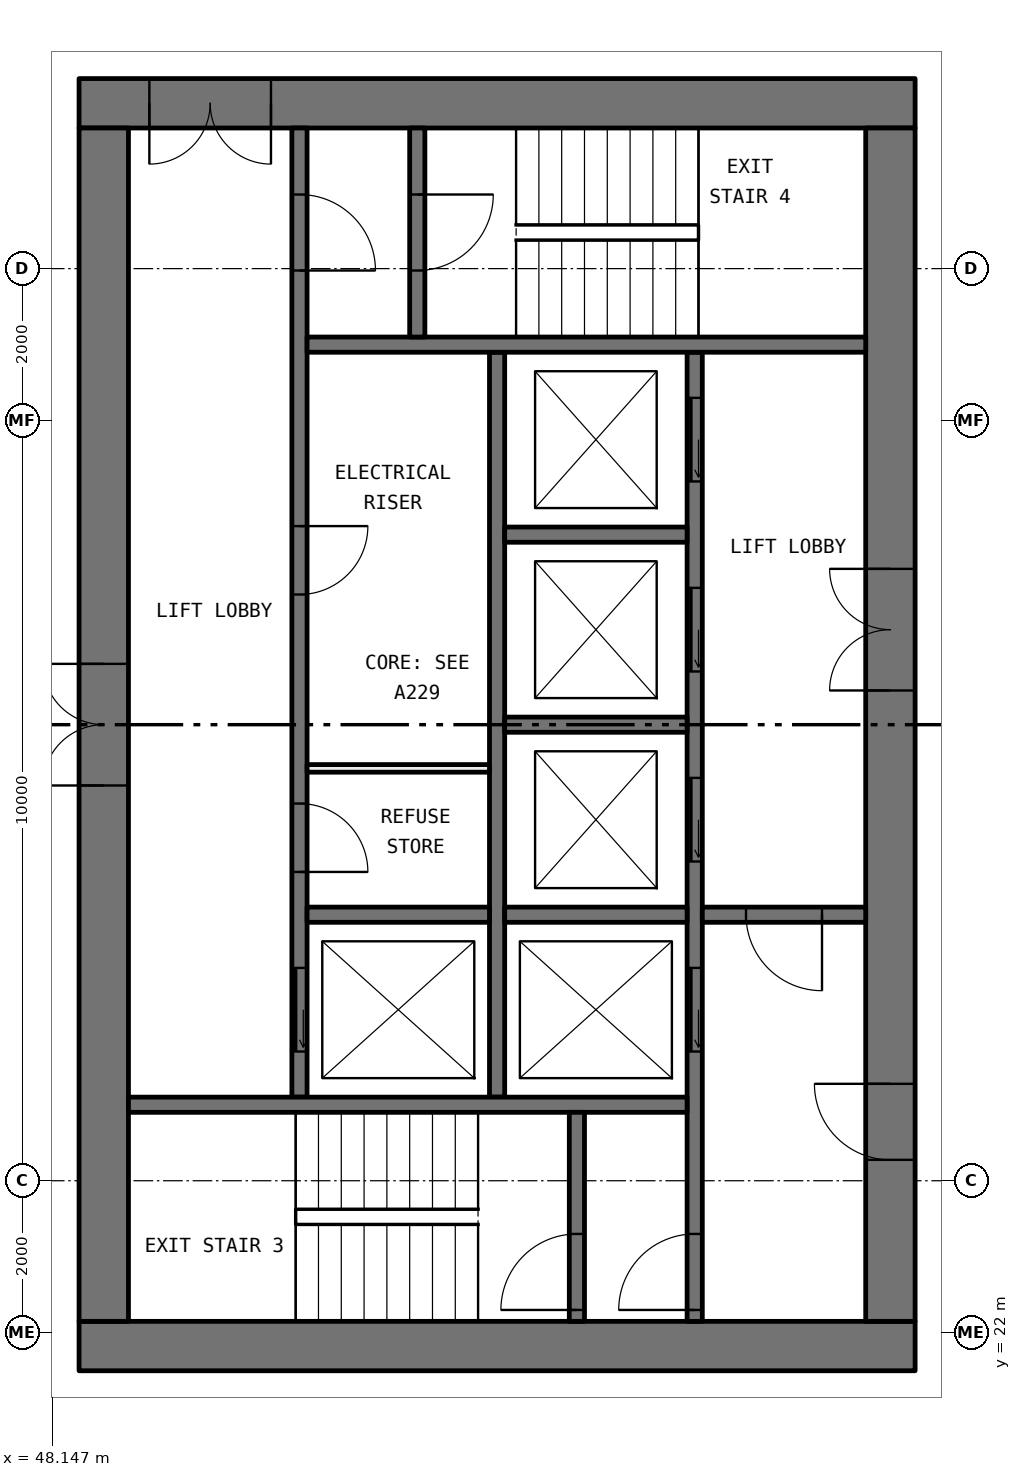
"""IFC4 building model, lengths in metres.
Left out: names, types, materials, properties, quantities, classifications, styles, units other than length and angle.
Written with IfcOpenShell. Run it as: python <this file> out.ifc"""

import sys

from ifc_helpers import new_model, si_unit, direction, frame, frame_2d, origin, place, context, subcontext, project, spatial, rectangle, extrude, element, fill, save


model = new_model("IFC4")
c1 = context("Model", 3, precision=1e-05, world=origin(), true_north=direction((0.0, 1.0)))
c2 = subcontext(c1, "Body", "Model", "MODEL_VIEW")
j1 = project(units=[si_unit("LENGTHUNIT", "METRE"), si_unit("PLANEANGLEUNIT", "RADIAN")], contexts=[c1])
p1 = place(None, origin())
s1 = spatial("IfcSite", under=j1, at=p1, CompositionType="ELEMENT")
p2 = place(p1, origin())
s2 = spatial("IfcBuilding", under=s1, at=p2, CompositionType="ELEMENT")
p3 = place(p2, frame((0.0, 0.0, 110.4)))
s3 = spatial("IfcBuildingStorey", under=s2, at=p3, CompositionType="ELEMENT", Elevation=110.4)
p4 = place(p3, frame((59.5, 21.825, 0.0), z_axis=(0.0, 0.0, 1.0), x_axis=(-1.0, 0.0, 0.0)))
e1 = element("IfcWall", 1, at=p4, inside=s3, PredefinedType="SHEAR", context=c2, shape_type="SweptSolid", body=[
    extrude(rectangle(XDim=11.0, YDim=0.65, at=frame_2d((5.5, 0.0))), origin(), (0.0, 0.0, 1.0), 3.05),
])
p5 = place(p3, frame((59.5, 38.175, 0.0), z_axis=(0.0, 0.0, 1.0), x_axis=(-1.0, 0.0, 0.0)))
e2 = element("IfcWall", 2, at=p5, inside=s3, PredefinedType="SHEAR", context=c2, shape_type="SweptSolid", body=[
    extrude(rectangle(XDim=11.0, YDim=0.65, at=frame_2d((5.5, 0.0))), origin(), (0.0, 0.0, 1.0), 3.05),
])
p6 = place(p5, frame((8.475, 0.0, 0.0)))
e3 = element("IfcOpeningElement", 3, at=p6, cuts=e2, PredefinedType="OPENING", context=c2, shape_type="SweptSolid", body=[
    extrude(rectangle(XDim=1.6, YDim=2.1, at=frame_2d((0.8, 1.05))), frame((0.0, 0.335, 0.0), z_axis=(0.0, -1.0, 0.0), x_axis=(1.0, 0.0, 0.0)), (0.0, 0.0, 1.0), 0.67),
])
p7 = place(p3, frame((59.175, 22.15, 0.0), z_axis=(0.0, 0.0, 1.0), x_axis=(0.0, 1.0, 0.0)))
e4 = element("IfcWall", 4, at=p7, inside=s3, PredefinedType="SHEAR", context=c2, shape_type="SweptSolid", body=[
    extrude(rectangle(XDim=15.7, YDim=0.65, at=frame_2d((7.85, 0.0))), origin(), (0.0, 0.0, 1.0), 3.05),
])
p8 = place(p7, frame((8.3, 0.0, 0.0)))
e5 = element("IfcOpeningElement", 5, at=p8, cuts=e4, PredefinedType="OPENING", context=c2, shape_type="SweptSolid", body=[
    extrude(rectangle(XDim=1.6, YDim=2.1, at=frame_2d((0.8, 1.05))), frame((0.0, 0.335, 0.0), z_axis=(0.0, -1.0, 0.0), x_axis=(1.0, 0.0, 0.0)), (0.0, 0.0, 1.0), 0.67),
])
p9 = place(p7, frame((2.125, 0.0, 0.0)))
e6 = element("IfcOpeningElement", 6, at=p9, cuts=e4, PredefinedType="OPENING", context=c2, shape_type="SweptSolid", body=[
    extrude(rectangle(XDim=1.0, YDim=2.1, at=frame_2d((0.5, 1.05))), frame((0.0, 0.335, 0.0), z_axis=(0.0, -1.0, 0.0), x_axis=(1.0, 0.0, 0.0)), (0.0, 0.0, 1.0), 0.67),
])
p10 = place(p3, frame((48.825, 22.15, 0.0), z_axis=(0.0, 0.0, 1.0), x_axis=(0.0, 1.0, 0.0)))
e7 = element("IfcWall", 7, at=p10, inside=s3, PredefinedType="SHEAR", context=c2, shape_type="SweptSolid", body=[
    extrude(rectangle(XDim=15.7, YDim=0.65, at=frame_2d((7.85, 0.0))), origin(), (0.0, 0.0, 1.0), 3.05),
])
p11 = place(p10, frame((7.05, 0.0, 0.0)))
e8 = element("IfcOpeningElement", 8, at=p11, cuts=e7, PredefinedType="OPENING", context=c2, shape_type="SweptSolid", body=[
    extrude(rectangle(XDim=1.6, YDim=2.1, at=frame_2d((0.8, 1.05))), frame((0.0, 0.335, 0.0), z_axis=(0.0, -1.0, 0.0), x_axis=(1.0, 0.0, 0.0)), (0.0, 0.0, 1.0), 0.67),
])
p12 = place(p3, frame((56.6, 22.15, 0.0), z_axis=(0.0, 0.0, 1.0), x_axis=(0.0, 1.0, 0.0)))
e9 = element("IfcWall", 9, at=p12, inside=s3, PredefinedType="SOLIDWALL", context=c2, shape_type="SweptSolid", body=[
    extrude(rectangle(XDim=12.75, YDim=0.2, at=frame_2d((6.375, 0.0))), origin(), (0.0, 0.0, 1.0), 3.05),
])
p13 = place(p12, frame((3.55, 0.0, 0.0)))
e10 = element("IfcOpeningElement", 10, at=p13, cuts=e9, PredefinedType="OPENING", context=c2, shape_type="SweptSolid", body=[
    extrude(rectangle(XDim=1.1, YDim=2.1, at=frame_2d((0.55, 1.05))), frame((0.0, 0.11, 0.0), z_axis=(0.0, -1.0, 0.0), x_axis=(1.0, 0.0, 0.0)), (0.0, 0.0, 1.0), 0.22),
])
p14 = place(p12, frame((6.05, 0.0, 0.0)))
e11 = element("IfcOpeningElement", 11, at=p14, cuts=e9, PredefinedType="OPENING", context=c2, shape_type="SweptSolid", body=[
    extrude(rectangle(XDim=1.1, YDim=2.1, at=frame_2d((0.55, 1.05))), frame((0.0, 0.11, 0.0), z_axis=(0.0, -1.0, 0.0), x_axis=(1.0, 0.0, 0.0)), (0.0, 0.0, 1.0), 0.22),
])
p15 = place(p12, frame((8.55, 0.0, 0.0)))
e12 = element("IfcOpeningElement", 12, at=p15, cuts=e9, PredefinedType="OPENING", context=c2, shape_type="SweptSolid", body=[
    extrude(rectangle(XDim=1.1, YDim=2.1, at=frame_2d((0.55, 1.05))), frame((0.0, 0.11, 0.0), z_axis=(0.0, -1.0, 0.0), x_axis=(1.0, 0.0, 0.0)), (0.0, 0.0, 1.0), 0.22),
])
p16 = place(p12, frame((11.05, 0.0, 0.0)))
e13 = element("IfcOpeningElement", 13, at=p16, cuts=e9, PredefinedType="OPENING", context=c2, shape_type="SweptSolid", body=[
    extrude(rectangle(XDim=1.1, YDim=2.1, at=frame_2d((0.55, 1.05))), frame((0.0, 0.11, 0.0), z_axis=(0.0, -1.0, 0.0), x_axis=(1.0, 0.0, 0.0)), (0.0, 0.0, 1.0), 0.22),
])
p17 = place(p12, frame((0.15, 0.0, 0.0)))
e14 = element("IfcOpeningElement", 14, at=p17, cuts=e9, PredefinedType="OPENING", context=c2, shape_type="SweptSolid", body=[
    extrude(rectangle(XDim=1.0, YDim=2.1, at=frame_2d((0.5, 1.05))), frame((0.0, 0.11, 0.0), z_axis=(0.0, -1.0, 0.0), x_axis=(1.0, 0.0, 0.0)), (0.0, 0.0, 1.0), 0.22),
])
p18 = place(p3, frame((51.4, 25.1, 0.0), z_axis=(0.0, 0.0, 1.0), x_axis=(0.0, 1.0, 0.0)))
e15 = element("IfcWall", 15, at=p18, inside=s3, PredefinedType="SOLIDWALL", context=c2, shape_type="SweptSolid", body=[
    extrude(rectangle(XDim=12.75, YDim=0.2, at=frame_2d((6.375, 0.0))), origin(), (0.0, 0.0, 1.0), 3.05),
])
p19 = place(p18, frame((0.6, 0.0, 0.0)))
e16 = element("IfcOpeningElement", 16, at=p19, cuts=e15, PredefinedType="OPENING", context=c2, shape_type="SweptSolid", body=[
    extrude(rectangle(XDim=1.1, YDim=2.1, at=frame_2d((0.55, 1.05))), frame((0.0, 0.11, 0.0), z_axis=(0.0, -1.0, 0.0), x_axis=(1.0, 0.0, 0.0)), (0.0, 0.0, 1.0), 0.22),
])
p20 = place(p18, frame((10.875, 0.0, 0.0)))
e17 = element("IfcOpeningElement", 17, at=p20, cuts=e15, PredefinedType="OPENING", context=c2, shape_type="SweptSolid", body=[
    extrude(rectangle(XDim=1.0, YDim=2.1, at=frame_2d((0.5, 1.05))), frame((0.0, 0.11, 0.0), z_axis=(0.0, -1.0, 0.0), x_axis=(1.0, 0.0, 0.0)), (0.0, 0.0, 1.0), 0.22),
])
p21 = place(p18, frame((2.962, 0.0, 0.0)))
e18 = element("IfcOpeningElement", 18, at=p21, cuts=e15, PredefinedType="OPENING", context=c2, shape_type="SweptSolid", body=[
    extrude(rectangle(XDim=0.9, YDim=2.1, at=frame_2d((0.45, 1.05))), frame((0.0, 0.11, 0.0), z_axis=(0.0, -1.0, 0.0), x_axis=(1.0, 0.0, 0.0)), (0.0, 0.0, 1.0), 0.22),
])
p22 = place(p18, frame((6.613, 0.0, 0.0)))
e19 = element("IfcOpeningElement", 19, at=p22, cuts=e15, PredefinedType="OPENING", context=c2, shape_type="SweptSolid", body=[
    extrude(rectangle(XDim=0.9, YDim=2.1, at=frame_2d((0.45, 1.05))), frame((0.0, 0.11, 0.0), z_axis=(0.0, -1.0, 0.0), x_axis=(1.0, 0.0, 0.0)), (0.0, 0.0, 1.0), 0.22),
])
p23 = place(p3, frame((54.0, 25.1, 0.0), z_axis=(0.0, 0.0, 1.0), x_axis=(0.0, 1.0, 0.0)))
e20 = element("IfcWall", 20, at=p23, inside=s3, PredefinedType="SOLIDWALL", context=c2, shape_type="SweptSolid", body=[
    extrude(rectangle(XDim=9.8, YDim=0.2, at=frame_2d((4.9, 0.0))), origin(), (0.0, 0.0, 1.0), 3.05),
])
for number, where, z_axis, x_axis in (
    (21, (56.5, 25.0, 0.0), (0.0, 0.0, 1.0), (-1.0, 0.0, 0.0)),
    (22, (58.85, 35.0, 0.0), (0.0, 0.0, 1.0), (-1.0, 0.0, 0.0)),
):
    element("IfcWall", number, at=place(p3, frame(where, z_axis=z_axis, x_axis=x_axis)), inside=s3, PredefinedType="SOLIDWALL", context=c2, shape_type="SweptSolid", body=[
        extrude(rectangle(XDim=7.35, YDim=0.2, at=frame_2d((3.675, 0.0))), origin(), (0.0, 0.0, 1.0), 3.05),
    ])
p24 = place(p3, frame((58.85, 27.5, 0.0), z_axis=(0.0, 0.0, 1.0), x_axis=(-1.0, 0.0, 0.0)))
e23 = element("IfcWall", 23, at=p24, inside=s3, PredefinedType="SOLIDWALL", context=c2, shape_type="SweptSolid", body=[
    extrude(rectangle(XDim=2.15, YDim=0.2, at=frame_2d((1.075, 0.0))), origin(), (0.0, 0.0, 1.0), 3.05),
])
p25 = place(p24, frame((0.575, 0.0, 0.0)))
e24 = element("IfcOpeningElement", 24, at=p25, cuts=e23, PredefinedType="OPENING", context=c2, shape_type="SweptSolid", body=[
    extrude(rectangle(XDim=1.0, YDim=2.1, at=frame_2d((0.5, 1.05))), frame((0.0, 0.11, 0.0), z_axis=(0.0, -1.0, 0.0), x_axis=(1.0, 0.0, 0.0)), (0.0, 0.0, 1.0), 0.22),
])
p26 = place(p3, frame((55.05, 22.15, 0.0), z_axis=(0.0, 0.0, 1.0), x_axis=(0.0, 1.0, 0.0)))
e25 = element("IfcWall", 25, at=p26, inside=s3, PredefinedType="SOLIDWALL", context=c2, shape_type="SweptSolid", body=[
    extrude(rectangle(XDim=2.75, YDim=0.2, at=frame_2d((1.375, 0.0))), origin(), (0.0, 0.0, 1.0), 3.05),
])
p27 = place(p26, frame((0.15, 0.0, 0.0)))
e26 = element("IfcOpeningElement", 26, at=p27, cuts=e25, PredefinedType="OPENING", context=c2, shape_type="SweptSolid", body=[
    extrude(rectangle(XDim=1.0, YDim=2.1, at=frame_2d((0.5, 1.05))), frame((0.0, 0.11, 0.0), z_axis=(0.0, -1.0, 0.0), x_axis=(1.0, 0.0, 0.0)), (0.0, 0.0, 1.0), 0.22),
])
p28 = place(p3, frame((52.95, 35.1, 0.0), z_axis=(0.0, 0.0, 1.0), x_axis=(0.0, 1.0, 0.0)))
e27 = element("IfcWall", 27, at=p28, inside=s3, PredefinedType="SOLIDWALL", context=c2, shape_type="SweptSolid", body=[
    extrude(rectangle(XDim=2.75, YDim=0.2, at=frame_2d((1.375, 0.0))), origin(), (0.0, 0.0, 1.0), 3.05),
])
p29 = place(p28, frame((0.875, 0.0, 0.0)))
e28 = element("IfcOpeningElement", 28, at=p29, cuts=e27, PredefinedType="OPENING", context=c2, shape_type="SweptSolid", body=[
    extrude(rectangle(XDim=1.0, YDim=2.1, at=frame_2d((0.5, 1.05))), frame((0.0, 0.11, 0.0), z_axis=(0.0, -1.0, 0.0), x_axis=(1.0, 0.0, 0.0)), (0.0, 0.0, 1.0), 0.22),
])
for number, where, z_axis, x_axis in (
    (29, (56.5, 27.5, 0.0), (0.0, 0.0, 1.0), (-1.0, 0.0, 0.0)),
    (30, (56.5, 30.0, 0.0), (0.0, 0.0, 1.0), (-1.0, 0.0, 0.0)),
    (31, (56.5, 32.5, 0.0), (0.0, 0.0, 1.0), (-1.0, 0.0, 0.0)),
    (32, (53.9, 27.5, 0.0), (0.0, 0.0, 1.0), (-1.0, 0.0, 0.0)),
):
    element("IfcWall", number, at=place(p3, frame(where, z_axis=z_axis, x_axis=x_axis)), inside=s3, PredefinedType="SOLIDWALL", context=c2, shape_type="SweptSolid", body=[
        extrude(rectangle(XDim=2.4, YDim=0.2, at=frame_2d((1.2, 0.0))), origin(), (0.0, 0.0, 1.0), 3.05),
    ])
p30 = place(p3, frame((53.9, 29.425, 0.0), z_axis=(0.0, 0.0, 1.0), x_axis=(-1.0, 0.0, 0.0)))
e33 = element("IfcWall", 33, at=p30, inside=s3, PredefinedType="PARTITIONING", context=c2, shape_type="SweptSolid", body=[
    extrude(rectangle(XDim=2.4, YDim=0.1, at=frame_2d((1.2, 0.0))), origin(), (0.0, 0.0, 1.0), 3.05),
])
p31 = place(p19, origin())
e34 = element("IfcDoor", 34, at=p31, inside=s3, OperationType="SLIDING_TO_LEFT", PredefinedType="DOOR", context=c2, shape_type="SweptSolid", body=[
    extrude(rectangle(XDim=1.1, YDim=2.1, at=frame_2d((0.55, 1.05))), frame((0.0, 0.025, 0.0), z_axis=(0.0, -1.0, 0.0), x_axis=(1.0, 0.0, 0.0)), (0.0, 0.0, 1.0), 0.05),
])
fill(e16, e34)
p32 = place(p13, origin())
e35 = element("IfcDoor", 35, at=p32, inside=s3, OperationType="SLIDING_TO_LEFT", PredefinedType="DOOR", context=c2, shape_type="SweptSolid", body=[
    extrude(rectangle(XDim=1.1, YDim=2.1, at=frame_2d((0.55, 1.05))), frame((0.0, 0.025, 0.0), z_axis=(0.0, -1.0, 0.0), x_axis=(1.0, 0.0, 0.0)), (0.0, 0.0, 1.0), 0.05),
])
fill(e10, e35)
p33 = place(p14, origin())
e36 = element("IfcDoor", 36, at=p33, inside=s3, OperationType="SLIDING_TO_LEFT", PredefinedType="DOOR", context=c2, shape_type="SweptSolid", body=[
    extrude(rectangle(XDim=1.1, YDim=2.1, at=frame_2d((0.55, 1.05))), frame((0.0, 0.025, 0.0), z_axis=(0.0, -1.0, 0.0), x_axis=(1.0, 0.0, 0.0)), (0.0, 0.0, 1.0), 0.05),
])
fill(e11, e36)
p34 = place(p15, origin())
e37 = element("IfcDoor", 37, at=p34, inside=s3, OperationType="SLIDING_TO_LEFT", PredefinedType="DOOR", context=c2, shape_type="SweptSolid", body=[
    extrude(rectangle(XDim=1.1, YDim=2.1, at=frame_2d((0.55, 1.05))), frame((0.0, 0.025, 0.0), z_axis=(0.0, -1.0, 0.0), x_axis=(1.0, 0.0, 0.0)), (0.0, 0.0, 1.0), 0.05),
])
fill(e12, e37)
p35 = place(p16, origin())
e38 = element("IfcDoor", 38, at=p35, inside=s3, OperationType="SLIDING_TO_LEFT", PredefinedType="DOOR", context=c2, shape_type="SweptSolid", body=[
    extrude(rectangle(XDim=1.1, YDim=2.1, at=frame_2d((0.55, 1.05))), frame((0.0, 0.025, 0.0), z_axis=(0.0, -1.0, 0.0), x_axis=(1.0, 0.0, 0.0)), (0.0, 0.0, 1.0), 0.05),
])
fill(e13, e38)
p36 = place(p27, origin())
e39 = element("IfcDoor", 39, at=p36, inside=s3, OperationType="SINGLE_SWING_RIGHT", PredefinedType="DOOR", context=c2, shape_type="SweptSolid", body=[
    extrude(rectangle(XDim=1.0, YDim=2.1, at=frame_2d((0.5, 1.05))), frame((0.0, 0.025, 0.0), z_axis=(0.0, -1.0, 0.0), x_axis=(1.0, 0.0, 0.0)), (0.0, 0.0, 1.0), 0.05),
])
fill(e26, e39)
p37 = place(p17, origin())
e40 = element("IfcDoor", 40, at=p37, inside=s3, OperationType="SINGLE_SWING_RIGHT", PredefinedType="DOOR", context=c2, shape_type="SweptSolid", body=[
    extrude(rectangle(XDim=1.0, YDim=2.1, at=frame_2d((0.5, 1.05))), frame((0.0, 0.025, 0.0), z_axis=(0.0, -1.0, 0.0), x_axis=(1.0, 0.0, 0.0)), (0.0, 0.0, 1.0), 0.05),
])
fill(e14, e40)
p38 = place(p20, frame((1.0, 0.0, 0.0), x_axis=(-1.0, 0.0, 0.0)))
e41 = element("IfcDoor", 41, at=p38, inside=s3, OperationType="SINGLE_SWING_LEFT", PredefinedType="DOOR", context=c2, shape_type="SweptSolid", body=[
    extrude(rectangle(XDim=1.0, YDim=2.1, at=frame_2d((0.5, 1.05))), frame((0.0, 0.025, 0.0), z_axis=(0.0, -1.0, 0.0), x_axis=(1.0, 0.0, 0.0)), (0.0, 0.0, 1.0), 0.05),
])
fill(e17, e41)
p39 = place(p29, frame((1.0, 0.0, 0.0), x_axis=(-1.0, 0.0, 0.0)))
e42 = element("IfcDoor", 42, at=p39, inside=s3, OperationType="SINGLE_SWING_RIGHT", PredefinedType="DOOR", context=c2, shape_type="SweptSolid", body=[
    extrude(rectangle(XDim=1.0, YDim=2.1, at=frame_2d((0.5, 1.05))), frame((0.0, 0.025, 0.0), z_axis=(0.0, -1.0, 0.0), x_axis=(1.0, 0.0, 0.0)), (0.0, 0.0, 1.0), 0.05),
])
fill(e28, e42)
p40 = place(p25, origin())
e43 = element("IfcDoor", 43, at=p40, inside=s3, OperationType="SINGLE_SWING_RIGHT", PredefinedType="DOOR", context=c2, shape_type="SweptSolid", body=[
    extrude(rectangle(XDim=1.0, YDim=2.1, at=frame_2d((0.5, 1.05))), frame((0.0, 0.025, 0.0), z_axis=(0.0, -1.0, 0.0), x_axis=(1.0, 0.0, 0.0)), (0.0, 0.0, 1.0), 0.05),
])
fill(e24, e43)
p41 = place(p8, origin())
e44 = element("IfcDoor", 44, at=p41, inside=s3, OperationType="DOUBLE_DOOR_SINGLE_SWING", PredefinedType="DOOR", context=c2, shape_type="SweptSolid", body=[
    extrude(rectangle(XDim=1.6, YDim=2.1, at=frame_2d((0.8, 1.05))), frame((0.0, 0.025, 0.0), z_axis=(0.0, -1.0, 0.0), x_axis=(1.0, 0.0, 0.0)), (0.0, 0.0, 1.0), 0.05),
])
fill(e5, e44)
p42 = place(p9, origin())
e45 = element("IfcDoor", 45, at=p42, inside=s3, OperationType="SINGLE_SWING_LEFT", PredefinedType="DOOR", context=c2, shape_type="SweptSolid", body=[
    extrude(rectangle(XDim=1.0, YDim=2.1, at=frame_2d((0.5, 1.05))), frame((0.0, 0.025, 0.0), z_axis=(0.0, -1.0, 0.0), x_axis=(1.0, 0.0, 0.0)), (0.0, 0.0, 1.0), 0.05),
])
fill(e6, e45)
p43 = place(p6, origin())
e46 = element("IfcDoor", 46, at=p43, inside=s3, OperationType="DOUBLE_DOOR_SINGLE_SWING", PredefinedType="DOOR", context=c2, shape_type="SweptSolid", body=[
    extrude(rectangle(XDim=1.6, YDim=2.1, at=frame_2d((0.8, 1.05))), frame((0.0, 0.025, 0.0), z_axis=(0.0, -1.0, 0.0), x_axis=(1.0, 0.0, 0.0)), (0.0, 0.0, 1.0), 0.05),
])
fill(e3, e46)
p44 = place(p11, origin())
e47 = element("IfcDoor", 47, at=p44, inside=s3, OperationType="DOUBLE_DOOR_SINGLE_SWING", PredefinedType="DOOR", context=c2, shape_type="SweptSolid", body=[
    extrude(rectangle(XDim=1.6, YDim=2.1, at=frame_2d((0.8, 1.05))), frame((0.0, 0.025, 0.0), z_axis=(0.0, -1.0, 0.0), x_axis=(1.0, 0.0, 0.0)), (0.0, 0.0, 1.0), 0.05),
])
fill(e8, e47)
p45 = place(p21, frame((0.9, 0.0, 0.0), x_axis=(-1.0, 0.0, 0.0)))
e48 = element("IfcDoor", 48, at=p45, inside=s3, OperationType="SINGLE_SWING_LEFT", PredefinedType="DOOR", context=c2, shape_type="SweptSolid", body=[
    extrude(rectangle(XDim=0.9, YDim=2.1, at=frame_2d((0.45, 1.05))), frame((0.0, 0.025, 0.0), z_axis=(0.0, -1.0, 0.0), x_axis=(1.0, 0.0, 0.0)), (0.0, 0.0, 1.0), 0.05),
])
fill(e18, e48)
p46 = place(p22, frame((0.9, 0.0, 0.0), x_axis=(-1.0, 0.0, 0.0)))
e49 = element("IfcDoor", 49, at=p46, inside=s3, OperationType="SINGLE_SWING_RIGHT", PredefinedType="DOOR", context=c2, shape_type="SweptSolid", body=[
    extrude(rectangle(XDim=0.9, YDim=2.1, at=frame_2d((0.45, 1.05))), frame((0.0, 0.025, 0.0), z_axis=(0.0, -1.0, 0.0), x_axis=(1.0, 0.0, 0.0)), (0.0, 0.0, 1.0), 0.05),
])
fill(e19, e49)
save(model, sys.argv[1])
